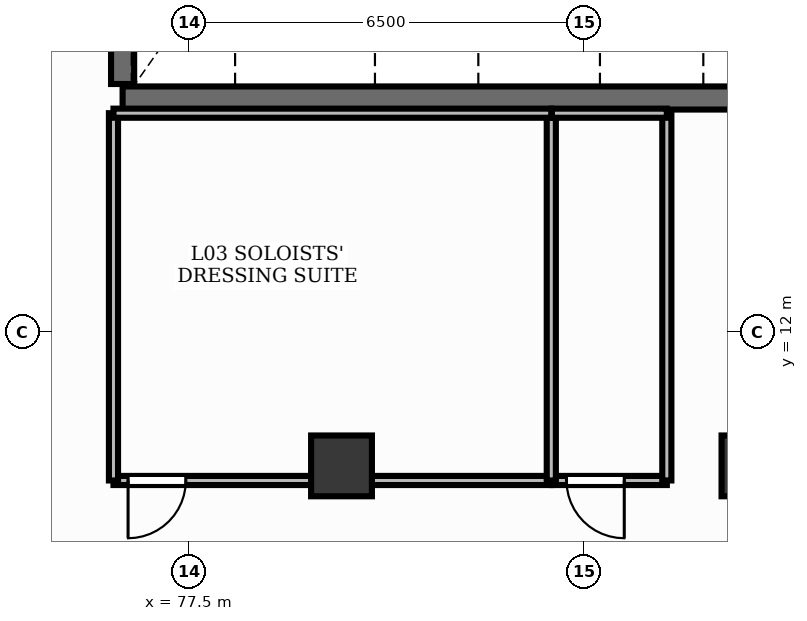
"""IFC4 building model, lengths in metres.
Left out: names, types, materials, properties, quantities, classifications, styles, units other than length and angle.
Written with IfcOpenShell. Run it as: python <this file> out.ifc"""

import sys

from ifc_helpers import new_model, si_unit, direction, frame, frame_2d, origin, origin_2d, place, context, subcontext, project, spatial, rectangle, extrude, element, fill, save


model = new_model("IFC4")
c1 = context("Model", 3, precision=1e-05, world=origin(), true_north=direction((0.0, 1.0)))
c2 = subcontext(c1, "Body", "Model", "MODEL_VIEW")
j1 = project(units=[si_unit("LENGTHUNIT", "METRE"), si_unit("PLANEANGLEUNIT", "RADIAN")], contexts=[c1])
p1 = place(None, origin())
s1 = spatial("IfcSite", under=j1, at=p1, CompositionType="ELEMENT")
p2 = place(p1, origin())
s2 = spatial("IfcBuilding", under=s1, at=p2, CompositionType="ELEMENT")
p3 = place(p2, frame((0.0, 0.0, 15.0)))
s3 = spatial("IfcBuildingStorey", under=s2, at=p3, CompositionType="ELEMENT", Elevation=15.0)
for number, where, z_axis, x_axis in (
    (1, (80.0, 9.8, 0.0), (0.0, 0.0, 1.0), (1.0, 0.0, 0.0)),
    (2, (86.75, 9.8, 0.0), (0.0, 0.0, 1.0), (1.0, 0.0, 0.0)),
):
    element("IfcColumn", number, at=place(p3, frame(where, z_axis=z_axis, x_axis=x_axis)), inside=s3, PredefinedType="COLUMN", context=c2, shape_type="SweptSolid", body=[
        extrude(rectangle(XDim=1.0, YDim=1.0, at=origin_2d()), origin(), (0.0, 0.0, 1.0), 5.1),
    ])
p4 = place(p3, frame((76.4, 15.85, 0.0), z_axis=(0.0, 0.0, 1.0), x_axis=(1.0, 0.0, 0.0)))
e3 = element("IfcWall", 3, at=p4, inside=s3, PredefinedType="SHEAR", context=c2, shape_type="SweptSolid", body=[
    extrude(rectangle(XDim=15.75, YDim=0.38, at=frame_2d((7.875, 0.0))), origin(), (0.0, 0.0, 1.0), 5.1),
])
p5 = place(p3, frame((76.4, 16.08, 0.0), z_axis=(0.0, 0.0, 1.0), x_axis=(0.0, 1.0, 0.0)))
e4 = element("IfcWall", 4, at=p5, inside=s3, PredefinedType="SHEAR", context=c2, shape_type="SweptSolid", body=[
    extrude(rectangle(XDim=21.84, YDim=0.38, at=frame_2d((10.92, 0.0))), origin(), (0.0, 0.0, 1.0), 5.1),
])
p6 = place(p3, frame((83.45, 9.56, 0.0), z_axis=(0.0, 0.0, 1.0), x_axis=(-1.0, 0.0, 0.0)))
e5 = element("IfcWall", 5, at=p6, inside=s3, PredefinedType="PARTITIONING", context=c2, shape_type="SweptSolid", body=[
    extrude(rectangle(XDim=7.2, YDim=0.15, at=frame_2d((3.6, 0.0))), origin(), (0.0, 0.0, 1.0), 3.36),
])
p7 = place(p6, frame((6.01, 0.0, 0.0)))
e6 = element("IfcOpeningElement", 6, at=p7, cuts=e5, PredefinedType="OPENING", context=c2, shape_type="SweptSolid", body=[
    extrude(rectangle(XDim=0.95, YDim=2.15, at=frame_2d((0.475, 1.075))), frame((0.0, 0.09, 0.0), z_axis=(0.0, -1.0, 0.0), x_axis=(1.0, 0.0, 0.0)), (0.0, 0.0, 1.0), 0.18),
])
p8 = place(p3, frame((85.35, 9.56, 0.0), z_axis=(0.0, 0.0, 1.0), x_axis=(-1.0, 0.0, 0.0)))
e7 = element("IfcWall", 7, at=p8, inside=s3, PredefinedType="PARTITIONING", context=c2, shape_type="SweptSolid", body=[
    extrude(rectangle(XDim=1.89, YDim=0.15, at=frame_2d((0.945, 0.0))), origin(), (0.0, 0.0, 1.0), 3.36),
])
p9 = place(p8, frame((0.7, 0.0, 0.0)))
e8 = element("IfcOpeningElement", 8, at=p9, cuts=e7, PredefinedType="OPENING", context=c2, shape_type="SweptSolid", body=[
    extrude(rectangle(XDim=0.95, YDim=2.15, at=frame_2d((0.475, 1.075))), frame((0.0, 0.09, 0.0), z_axis=(0.0, -1.0, 0.0), x_axis=(1.0, 0.0, 0.0)), (0.0, 0.0, 1.0), 0.18),
])
for number, where, z_axis, x_axis in (
    (9, (83.45, 15.6, 0.0), (0.0, 0.0, 1.0), (0.0, -1.0, 0.0)),
    (10, (76.25, 9.56, 0.0), (0.0, 0.0, 1.0), (0.0, 1.0, 0.0)),
):
    element("IfcWall", number, at=place(p3, frame(where, z_axis=z_axis, x_axis=x_axis)), inside=s3, PredefinedType="PARTITIONING", context=c2, shape_type="SweptSolid", body=[
        extrude(rectangle(XDim=6.04, YDim=0.15, at=frame_2d((3.02, 0.0))), origin(), (0.0, 0.0, 1.0), 3.36),
    ])
p10 = place(p3, frame((76.25, 15.6, 0.0), z_axis=(0.0, 0.0, 1.0), x_axis=(1.0, 0.0, 0.0)))
e11 = element("IfcWall", 11, at=p10, inside=s3, PredefinedType="PARTITIONING", context=c2, shape_type="SweptSolid", body=[
    extrude(rectangle(XDim=7.2, YDim=0.15, at=frame_2d((3.6, 0.0))), origin(), (0.0, 0.0, 1.0), 3.36),
])
p11 = place(p3, frame((85.35, 15.6, 0.0), z_axis=(0.0, 0.0, 1.0), x_axis=(0.0, -1.0, 0.0)))
e12 = element("IfcWall", 12, at=p11, inside=s3, PredefinedType="PARTITIONING", context=c2, shape_type="SweptSolid", body=[
    extrude(rectangle(XDim=6.04, YDim=0.15, at=frame_2d((3.02, 0.0))), origin(), (0.0, 0.0, 1.0), 3.36),
])
p12 = place(p3, frame((83.46, 15.6, 0.0), z_axis=(0.0, 0.0, 1.0), x_axis=(1.0, 0.0, 0.0)))
e13 = element("IfcWall", 13, at=p12, inside=s3, PredefinedType="PARTITIONING", context=c2, shape_type="SweptSolid", body=[
    extrude(rectangle(XDim=1.89, YDim=0.15, at=frame_2d((0.945, 0.0))), origin(), (0.0, 0.0, 1.0), 3.36),
])
p13 = place(p7, origin())
e14 = element("IfcDoor", 14, at=p13, inside=s3, OperationType="SINGLE_SWING_RIGHT", PredefinedType="DOOR", context=c2, shape_type="SweptSolid", body=[
    extrude(rectangle(XDim=0.95, YDim=2.15, at=frame_2d((0.475, 1.075))), frame((0.0, 0.025, 0.0), z_axis=(0.0, -1.0, 0.0), x_axis=(1.0, 0.0, 0.0)), (0.0, 0.0, 1.0), 0.05),
])
fill(e6, e14)
p14 = place(p9, origin())
e15 = element("IfcDoor", 15, at=p14, inside=s3, OperationType="SINGLE_SWING_LEFT", PredefinedType="DOOR", context=c2, shape_type="SweptSolid", body=[
    extrude(rectangle(XDim=0.95, YDim=2.15, at=frame_2d((0.475, 1.075))), frame((0.0, 0.025, 0.0), z_axis=(0.0, -1.0, 0.0), x_axis=(1.0, 0.0, 0.0)), (0.0, 0.0, 1.0), 0.05),
])
fill(e8, e15)
save(model, sys.argv[1])
